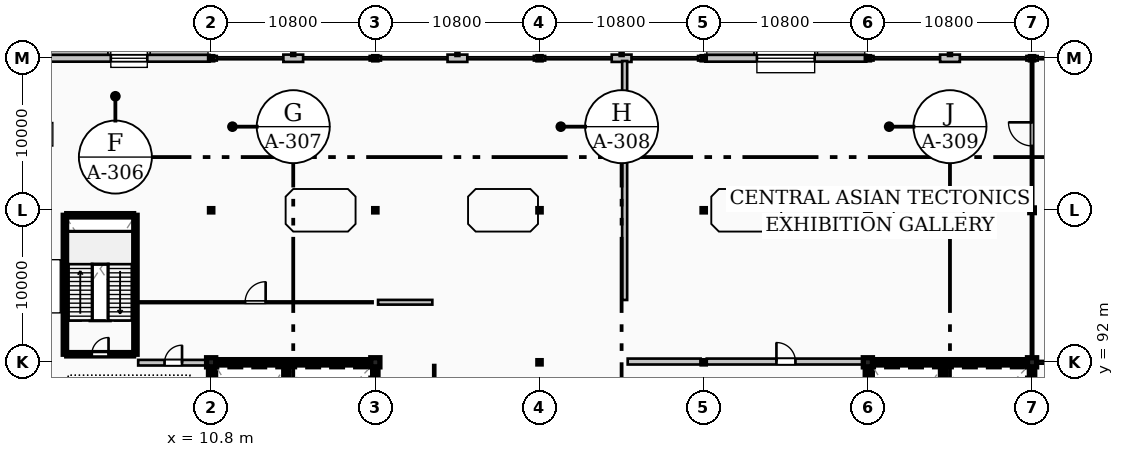
"""IFC4 building model, lengths in metres.
Left out: names, types, materials, properties, quantities, classifications, styles, units other than length and angle.
Written with IfcOpenShell. Run it as: python <this file> out.ifc"""

import sys

from ifc_helpers import new_model, si_unit, direction, frame, frame_2d, origin, origin_2d, place, context, subcontext, project, spatial, rectangle, hollow_rectangle, i_section, extrude, element, fill, save


model = new_model("IFC4")
c1 = context("Model", 3, precision=1e-05, world=origin(), true_north=direction((0.0, 1.0)))
c2 = subcontext(c1, "Body", "Model", "MODEL_VIEW")
j1 = project(units=[si_unit("LENGTHUNIT", "METRE"), si_unit("PLANEANGLEUNIT", "RADIAN")], contexts=[c1])
p1 = place(None, origin())
s1 = spatial("IfcSite", under=j1, at=p1, CompositionType="ELEMENT")
p2 = place(p1, origin())
s2 = spatial("IfcBuilding", under=s1, at=p2, CompositionType="ELEMENT")
p3 = place(p2, frame((0.0, 0.0, 24.0)))
s3 = spatial("IfcBuildingStorey", under=s2, at=p3, CompositionType="ELEMENT", Elevation=24.0)
p4 = place(p3, frame((10.8, 92.0, 0.0), z_axis=(0.0, 0.0, 1.0), x_axis=(1.0, 0.0, 0.0)))
e1 = element("IfcColumn", 1, at=p4, inside=s3, PredefinedType="COLUMN", context=c2, shape_type="SweptSolid", body=[
    extrude(rectangle(XDim=0.6, YDim=0.6, at=origin_2d()), origin(), (0.0, 0.0, 1.0), 4.8),
])
for number, where, z_axis, x_axis in (
    (2, (10.8, 102.0, 0.0), (0.0, 0.0, 1.0), (1.0, 0.0, 0.0)),
    (3, (10.8, 112.0, 0.0), (0.0, 0.0, 1.0), (1.0, 0.0, 0.0)),
):
    element("IfcColumn", number, at=place(p3, frame(where, z_axis=z_axis, x_axis=x_axis)), inside=s3, PredefinedType="COLUMN", context=c2, shape_type="SweptSolid", body=[
        extrude(hollow_rectangle(XDim=0.22, YDim=0.22, WallThickness=0.012, InnerFilletRadius=0.012, OuterFilletRadius=0.025, at=origin_2d()), origin(), (0.0, 0.0, 1.0), 4.8),
    ])
p5 = place(p3, frame((21.6, 92.0, 0.0), z_axis=(0.0, 0.0, 1.0), x_axis=(1.0, 0.0, 0.0)))
e4 = element("IfcColumn", 4, at=p5, inside=s3, PredefinedType="COLUMN", context=c2, shape_type="SweptSolid", body=[
    extrude(rectangle(XDim=0.6, YDim=0.6, at=origin_2d()), origin(), (0.0, 0.0, 1.0), 4.8),
])
for number, where, z_axis, x_axis in (
    (5, (21.6, 102.0, 0.0), (0.0, 0.0, 1.0), (1.0, 0.0, 0.0)),
    (6, (21.6, 112.0, 0.0), (0.0, 0.0, 1.0), (1.0, 0.0, 0.0)),
    (7, (32.4, 92.0, 0.0), (0.0, 0.0, 1.0), (1.0, 0.0, 0.0)),
    (8, (32.4, 102.0, 0.0), (0.0, 0.0, 1.0), (1.0, 0.0, 0.0)),
    (9, (32.4, 112.0, 0.0), (0.0, 0.0, 1.0), (1.0, 0.0, 0.0)),
    (10, (43.2, 92.0, 0.0), (0.0, 0.0, 1.0), (1.0, 0.0, 0.0)),
    (11, (43.2, 102.0, 0.0), (0.0, 0.0, 1.0), (1.0, 0.0, 0.0)),
    (12, (43.2, 112.0, 0.0), (0.0, 0.0, 1.0), (1.0, 0.0, 0.0)),
):
    element("IfcColumn", number, at=place(p3, frame(where, z_axis=z_axis, x_axis=x_axis)), inside=s3, PredefinedType="COLUMN", context=c2, shape_type="SweptSolid", body=[
        extrude(hollow_rectangle(XDim=0.22, YDim=0.22, WallThickness=0.012, InnerFilletRadius=0.012, OuterFilletRadius=0.025, at=origin_2d()), origin(), (0.0, 0.0, 1.0), 4.8),
    ])
p6 = place(p3, frame((54.0, 92.0, 0.0), z_axis=(0.0, 0.0, 1.0), x_axis=(1.0, 0.0, 0.0)))
e13 = element("IfcColumn", 13, at=p6, inside=s3, PredefinedType="COLUMN", context=c2, shape_type="SweptSolid", body=[
    extrude(rectangle(XDim=0.6, YDim=0.6, at=origin_2d()), origin(), (0.0, 0.0, 1.0), 4.8),
])
p7 = place(p3, frame((54.0, 102.0, 0.0), z_axis=(0.0, 0.0, 1.0), x_axis=(1.0, 0.0, 0.0)))
e14 = element("IfcColumn", 14, at=p7, inside=s3, PredefinedType="COLUMN", context=c2, shape_type="SweptSolid", body=[
    extrude(i_section(OverallWidth=0.3, OverallDepth=0.31, WebThickness=0.009, FlangeThickness=0.015, FilletRadius=0.027, at=origin_2d()), origin(), (0.0, 0.0, 1.0), 4.8),
])
p8 = place(p3, frame((54.0, 112.0, 0.0), z_axis=(0.0, 0.0, 1.0), x_axis=(1.0, 0.0, 0.0)))
e15 = element("IfcColumn", 15, at=p8, inside=s3, PredefinedType="COLUMN", context=c2, shape_type="SweptSolid", body=[
    extrude(hollow_rectangle(XDim=0.22, YDim=0.22, WallThickness=0.012, InnerFilletRadius=0.012, OuterFilletRadius=0.025, at=origin_2d()), origin(), (0.0, 0.0, 1.0), 4.8),
])
p9 = place(p3, frame((64.8, 92.0, 0.0), z_axis=(0.0, 0.0, 1.0), x_axis=(1.0, 0.0, 0.0)))
e16 = element("IfcColumn", 16, at=p9, inside=s3, PredefinedType="COLUMN", context=c2, shape_type="SweptSolid", body=[
    extrude(rectangle(XDim=0.6, YDim=0.6, at=origin_2d()), origin(), (0.0, 0.0, 1.0), 4.8),
])
p10 = place(p3, frame((64.8, 102.0, 0.0), z_axis=(0.0, 0.0, 1.0), x_axis=(1.0, 0.0, 0.0)))
e17 = element("IfcColumn", 17, at=p10, inside=s3, PredefinedType="COLUMN", context=c2, shape_type="SweptSolid", body=[
    extrude(i_section(OverallWidth=0.3, OverallDepth=0.31, WebThickness=0.009, FlangeThickness=0.015, FilletRadius=0.027, at=origin_2d()), origin(), (0.0, 0.0, 1.0), 4.8),
])
p11 = place(p3, frame((64.8, 112.0, 0.0), z_axis=(0.0, 0.0, 1.0), x_axis=(1.0, 0.0, 0.0)))
e18 = element("IfcColumn", 18, at=p11, inside=s3, PredefinedType="COLUMN", context=c2, shape_type="SweptSolid", body=[
    extrude(hollow_rectangle(XDim=0.22, YDim=0.22, WallThickness=0.012, InnerFilletRadius=0.012, OuterFilletRadius=0.025, at=origin_2d()), origin(), (0.0, 0.0, 1.0), 4.8),
])
p12 = place(p3, frame((65.17, 112.0, 0.0), z_axis=(0.0, 0.0, 1.0), x_axis=(-1.0, 0.0, 0.0)))
e19 = element("IfcWall", 19, at=p12, inside=s3, PredefinedType="STANDARD", context=c2, shape_type="SweptSolid", body=[
    extrude(rectangle(XDim=0.264, YDim=0.3, at=frame_2d((0.132, 0.0))), origin(), (0.0, 0.0, 1.0), 4.56),
])
p13 = place(p3, frame((60.05, 112.0, 0.0), z_axis=(0.0, 0.0, 1.0), x_axis=(-1.0, 0.0, 0.0)))
e20 = element("IfcWall", 20, at=p13, inside=s3, PredefinedType="STANDARD", context=c2, shape_type="SweptSolid", body=[
    extrude(rectangle(XDim=1.3, YDim=0.48, at=frame_2d((0.65, 0.0))), origin(), (0.0, 0.0, 1.0), 4.219),
])
for number, where, z_axis, x_axis in (
    (21, (64.694, 112.0, 0.0), (0.0, 0.0, 1.0), (-1.0, 0.0, 0.0)),
    (22, (54.37, 112.0, 0.0), (0.0, 0.0, 1.0), (-1.0, 0.0, 0.0)),
):
    element("IfcWall", number, at=place(p3, frame(where, z_axis=z_axis, x_axis=x_axis)), inside=s3, PredefinedType="STANDARD", context=c2, shape_type="SweptSolid", body=[
        extrude(rectangle(XDim=0.264, YDim=0.3, at=frame_2d((0.132, 0.0))), origin(), (0.0, 0.0, 1.0), 4.56),
    ])
p14 = place(p3, frame((53.894, 112.0, 0.0), z_axis=(0.0, 0.0, 1.0), x_axis=(-1.0, 0.0, 0.0)))
e23 = element("IfcWall", 23, at=p14, inside=s3, PredefinedType="STANDARD", context=c2, shape_type="SweptSolid", body=[
    extrude(rectangle(XDim=10.588, YDim=0.45, at=frame_2d((5.294, 0.0))), origin(), (0.0, 0.0, 1.0), 4.219),
])
p15 = place(p14, frame((3.394, 0.0, 1.0)))
e24 = element("IfcOpeningElement", 24, at=p15, cuts=e23, PredefinedType="OPENING", context=c2, shape_type="SweptSolid", body=[
    extrude(rectangle(XDim=3.8, YDim=2.1, at=frame_2d((1.9, 1.05))), frame((0.0, 0.235, 0.0), z_axis=(0.0, -1.0, 0.0), x_axis=(1.0, 0.0, 0.0)), (0.0, 0.0, 1.0), 0.47),
])
p16 = place(p3, frame((38.45, 112.0, 0.0), z_axis=(0.0, 0.0, 1.0), x_axis=(-1.0, 0.0, 0.0)))
e25 = element("IfcWall", 25, at=p16, inside=s3, PredefinedType="STANDARD", context=c2, shape_type="SweptSolid", body=[
    extrude(rectangle(XDim=1.3, YDim=0.48, at=frame_2d((0.65, 0.0))), origin(), (0.0, 0.0, 1.0), 4.219),
])
for number, where, z_axis, x_axis in (
    (26, (43.094, 112.0, 0.0), (0.0, 0.0, 1.0), (-1.0, 0.0, 0.0)),
    (27, (32.77, 112.0, 0.0), (0.0, 0.0, 1.0), (-1.0, 0.0, 0.0)),
):
    element("IfcWall", number, at=place(p3, frame(where, z_axis=z_axis, x_axis=x_axis)), inside=s3, PredefinedType="STANDARD", context=c2, shape_type="SweptSolid", body=[
        extrude(rectangle(XDim=0.264, YDim=0.3, at=frame_2d((0.132, 0.0))), origin(), (0.0, 0.0, 1.0), 4.56),
    ])
p17 = place(p3, frame((27.65, 112.0, 0.0), z_axis=(0.0, 0.0, 1.0), x_axis=(-1.0, 0.0, 0.0)))
e28 = element("IfcWall", 28, at=p17, inside=s3, PredefinedType="STANDARD", context=c2, shape_type="SweptSolid", body=[
    extrude(rectangle(XDim=1.3, YDim=0.48, at=frame_2d((0.65, 0.0))), origin(), (0.0, 0.0, 1.0), 4.219),
])
for number, where, z_axis, x_axis in (
    (29, (32.294, 112.0, 0.0), (0.0, 0.0, 1.0), (-1.0, 0.0, 0.0)),
    (30, (21.97, 112.0, 0.0), (0.0, 0.0, 1.0), (-1.0, 0.0, 0.0)),
):
    element("IfcWall", number, at=place(p3, frame(where, z_axis=z_axis, x_axis=x_axis)), inside=s3, PredefinedType="STANDARD", context=c2, shape_type="SweptSolid", body=[
        extrude(rectangle(XDim=0.264, YDim=0.3, at=frame_2d((0.132, 0.0))), origin(), (0.0, 0.0, 1.0), 4.56),
    ])
p18 = place(p3, frame((16.85, 112.0, 0.0), z_axis=(0.0, 0.0, 1.0), x_axis=(-1.0, 0.0, 0.0)))
e31 = element("IfcWall", 31, at=p18, inside=s3, PredefinedType="STANDARD", context=c2, shape_type="SweptSolid", body=[
    extrude(rectangle(XDim=1.3, YDim=0.48, at=frame_2d((0.65, 0.0))), origin(), (0.0, 0.0, 1.0), 4.219),
])
for number, where, z_axis, x_axis in (
    (32, (21.494, 112.0, 0.0), (0.0, 0.0, 1.0), (-1.0, 0.0, 0.0)),
    (33, (11.17, 112.0, 0.0), (0.0, 0.0, 1.0), (-1.0, 0.0, 0.0)),
):
    element("IfcWall", number, at=place(p3, frame(where, z_axis=z_axis, x_axis=x_axis)), inside=s3, PredefinedType="STANDARD", context=c2, shape_type="SweptSolid", body=[
        extrude(rectangle(XDim=0.264, YDim=0.3, at=frame_2d((0.132, 0.0))), origin(), (0.0, 0.0, 1.0), 4.56),
    ])
p19 = place(p3, frame((10.694, 112.0, 0.0), z_axis=(0.0, 0.0, 1.0), x_axis=(-1.0, 0.0, 0.0)))
e34 = element("IfcWall", 34, at=p19, inside=s3, PredefinedType="STANDARD", context=c2, shape_type="SweptSolid", body=[
    extrude(rectangle(XDim=10.588, YDim=0.45, at=frame_2d((5.294, 0.0))), origin(), (0.0, 0.0, 1.0), 4.219),
])
p20 = place(p19, frame((4.094, 0.0, 1.0)))
e35 = element("IfcOpeningElement", 35, at=p20, cuts=e34, PredefinedType="OPENING", context=c2, shape_type="SweptSolid", body=[
    extrude(rectangle(XDim=2.4, YDim=2.4, at=frame_2d((1.2, 1.2))), frame((0.0, 0.235, 0.0), z_axis=(0.0, -1.0, 0.0), x_axis=(1.0, 0.0, 0.0)), (0.0, 0.0, 1.0), 0.47),
])
p21 = place(p3, frame((11.1, 92.0, 0.0), z_axis=(0.0, 0.0, 1.0), x_axis=(1.0, 0.0, 0.0)))
e36 = element("IfcWall", 36, at=p21, inside=s3, PredefinedType="SHEAR", context=c2, shape_type="SweptSolid", body=[
    extrude(rectangle(XDim=10.2, YDim=0.35, at=frame_2d((5.1, 0.0))), origin(), (0.0, 0.0, 1.0), 4.56),
])
p22 = place(p3, frame((10.8, 82.3, 0.0), z_axis=(0.0, 0.0, 1.0), x_axis=(0.0, 1.0, 0.0)))
e37 = element("IfcWall", 37, at=p22, inside=s3, PredefinedType="SHEAR", context=c2, shape_type="SweptSolid", body=[
    extrude(rectangle(XDim=9.4, YDim=0.35, at=frame_2d((4.7, 0.0))), origin(), (0.0, 0.0, 1.0), 4.56),
])
p23 = place(p3, frame((21.6, 82.3, 0.0), z_axis=(0.0, 0.0, 1.0), x_axis=(0.0, 1.0, 0.0)))
e38 = element("IfcWall", 38, at=p23, inside=s3, PredefinedType="SHEAR", context=c2, shape_type="SweptSolid", body=[
    extrude(rectangle(XDim=9.4, YDim=0.35, at=frame_2d((4.7, 0.0))), origin(), (0.0, 0.0, 1.0), 4.56),
])
p24 = place(p23, frame((0.88, 0.0, 0.0)))
e39 = element("IfcOpeningElement", 39, at=p24, cuts=e38, PredefinedType="OPENING", context=c2, shape_type="SweptSolid", body=[
    extrude(rectangle(XDim=1.8, YDim=2.25, at=frame_2d((0.9, 1.125))), frame((0.0, 0.185, 0.0), z_axis=(0.0, -1.0, 0.0), x_axis=(1.0, 0.0, 0.0)), (0.0, 0.0, 1.0), 0.37),
])
p25 = place(p3, frame((15.75, 82.22, 0.0), z_axis=(0.0, 0.0, 1.0), x_axis=(0.0, 1.0, 0.0)))
e40 = element("IfcWall", 40, at=p25, inside=s3, PredefinedType="SHEAR", context=c2, shape_type="SweptSolid", body=[
    extrude(rectangle(XDim=9.605, YDim=0.35, at=frame_2d((4.802, 0.0))), origin(), (0.0, 0.0, 1.0), 4.56),
])
p26 = place(p25, frame((0.9, 0.0, 0.0)))
e41 = element("IfcOpeningElement", 41, at=p26, cuts=e40, PredefinedType="OPENING", context=c2, shape_type="SweptSolid", body=[
    extrude(rectangle(XDim=1.1, YDim=2.2, at=frame_2d((0.55, 1.1))), frame((0.0, 0.185, 0.0), z_axis=(0.0, -1.0, 0.0), x_axis=(1.0, 0.0, 0.0)), (0.0, 0.0, 1.0), 0.37),
])
p27 = place(p3, frame((54.3, 92.0, 0.0), z_axis=(0.0, 0.0, 1.0), x_axis=(1.0, 0.0, 0.0)))
e42 = element("IfcWall", 42, at=p27, inside=s3, PredefinedType="SHEAR", context=c2, shape_type="SweptSolid", body=[
    extrude(rectangle(XDim=10.2, YDim=0.35, at=frame_2d((5.1, 0.0))), origin(), (0.0, 0.0, 1.0), 4.56),
])
p28 = place(p3, frame((54.0, 82.3, 0.0), z_axis=(0.0, 0.0, 1.0), x_axis=(0.0, 1.0, 0.0)))
e43 = element("IfcWall", 43, at=p28, inside=s3, PredefinedType="SHEAR", context=c2, shape_type="SweptSolid", body=[
    extrude(rectangle(XDim=9.4, YDim=0.35, at=frame_2d((4.7, 0.0))), origin(), (0.0, 0.0, 1.0), 4.56),
])
p29 = place(p3, frame((64.8, 82.3, 0.0), z_axis=(0.0, 0.0, 1.0), x_axis=(0.0, 1.0, 0.0)))
e44 = element("IfcWall", 44, at=p29, inside=s3, PredefinedType="SHEAR", context=c2, shape_type="SweptSolid", body=[
    extrude(rectangle(XDim=9.4, YDim=0.35, at=frame_2d((4.7, 0.0))), origin(), (0.0, 0.0, 1.0), 4.56),
])
p30 = place(p29, frame((0.88, 0.0, 0.0)))
e45 = element("IfcOpeningElement", 45, at=p30, cuts=e44, PredefinedType="OPENING", context=c2, shape_type="SweptSolid", body=[
    extrude(rectangle(XDim=1.8, YDim=2.25, at=frame_2d((0.9, 1.125))), frame((0.0, 0.185, 0.0), z_axis=(0.0, -1.0, 0.0), x_axis=(1.0, 0.0, 0.0)), (0.0, 0.0, 1.0), 0.37),
])
p31 = place(p3, frame((58.95, 82.175, 0.0), z_axis=(0.0, 0.0, 1.0), x_axis=(0.0, 1.0, 0.0)))
e46 = element("IfcWall", 46, at=p31, inside=s3, PredefinedType="SHEAR", context=c2, shape_type="SweptSolid", body=[
    extrude(rectangle(XDim=9.65, YDim=0.35, at=frame_2d((4.825, 0.0))), origin(), (0.0, 0.0, 1.0), 4.56),
])
p32 = place(p31, frame((0.9, 0.0, 0.0)))
e47 = element("IfcOpeningElement", 47, at=p32, cuts=e46, PredefinedType="OPENING", context=c2, shape_type="SweptSolid", body=[
    extrude(rectangle(XDim=1.1, YDim=2.2, at=frame_2d((0.55, 1.1))), frame((0.0, 0.185, 0.0), z_axis=(0.0, -1.0, 0.0), x_axis=(1.0, 0.0, 0.0)), (0.0, 0.0, 1.0), 0.37),
])
for number, where, z_axis, x_axis in (
    (48, (1.18, 92.53, 0.0), (0.0, 0.0, 1.0), (0.0, 1.0, 0.0)),
    (49, (5.82, 92.53, 0.0), (0.0, 0.0, 1.0), (0.0, 1.0, 0.0)),
):
    element("IfcWall", number, at=place(p3, frame(where, z_axis=z_axis, x_axis=x_axis)), inside=s3, PredefinedType="SHEAR", context=c2, shape_type="SweptSolid", body=[
        extrude(rectangle(XDim=9.14, YDim=0.22, at=frame_2d((4.57, 0.0))), origin(), (0.0, 0.0, 1.0), 4.56),
    ])
p33 = place(p3, frame((1.3, 101.67, 0.0), z_axis=(0.0, 0.0, 1.0), x_axis=(1.0, 0.0, 0.0)))
e50 = element("IfcWall", 50, at=p33, inside=s3, PredefinedType="SHEAR", context=c2, shape_type="SweptSolid", body=[
    extrude(rectangle(XDim=4.4, YDim=0.22, at=frame_2d((2.2, 0.0))), origin(), (0.0, 0.0, 1.0), 4.56),
])
p34 = place(p3, frame((1.3, 92.53, 0.0), z_axis=(0.0, 0.0, 1.0), x_axis=(1.0, 0.0, 0.0)))
e51 = element("IfcWall", 51, at=p34, inside=s3, PredefinedType="SHEAR", context=c2, shape_type="SweptSolid", body=[
    extrude(rectangle(XDim=4.4, YDim=0.22, at=frame_2d((2.2, 0.0))), origin(), (0.0, 0.0, 1.0), 4.56),
])
p35 = place(p34, frame((1.65, 0.0, 0.0)))
e52 = element("IfcOpeningElement", 52, at=p35, cuts=e51, PredefinedType="OPENING", context=c2, shape_type="SweptSolid", body=[
    extrude(rectangle(XDim=1.1, YDim=2.2, at=frame_2d((0.55, 1.1))), frame((0.0, 0.12, 0.0), z_axis=(0.0, -1.0, 0.0), x_axis=(1.0, 0.0, 0.0)), (0.0, 0.0, 1.0), 0.24),
])
p36 = place(p3, frame((6.0, 91.975, 0.0), z_axis=(0.0, 0.0, 1.0), x_axis=(1.0, 0.0, 0.0)))
e53 = element("IfcWall", 53, at=p36, inside=s3, PredefinedType="PARTITIONING", context=c2, shape_type="SweptSolid", body=[
    extrude(rectangle(XDim=4.62, YDim=0.37, at=frame_2d((2.31, 0.0))), origin(), (0.0, 0.0, 1.0), 4.17),
])
p37 = place(p36, frame((1.735, 0.0, 0.0)))
e54 = element("IfcOpeningElement", 54, at=p37, cuts=e53, PredefinedType="OPENING", context=c2, shape_type="SweptSolid", body=[
    extrude(rectangle(XDim=1.15, YDim=2.25, at=frame_2d((0.575, 1.125))), frame((0.0, 0.195, 0.0), z_axis=(0.0, -1.0, 0.0), x_axis=(1.0, 0.0, 0.0)), (0.0, 0.0, 1.0), 0.39),
])
p38 = place(p3, frame((38.2, 92.05, 0.0), z_axis=(0.0, 0.0, 1.0), x_axis=(1.0, 0.0, 0.0)))
e55 = element("IfcWall", 55, at=p38, inside=s3, PredefinedType="PARTITIONING", context=c2, shape_type="SweptSolid", body=[
    extrude(rectangle(XDim=4.8, YDim=0.39, at=frame_2d((2.4, 0.0))), origin(), (0.0, 0.0, 1.0), 4.17),
])
p39 = place(p3, frame((43.4, 92.05, 0.0), z_axis=(0.0, 0.0, 1.0), x_axis=(1.0, 0.0, 0.0)))
e56 = element("IfcWall", 56, at=p39, inside=s3, PredefinedType="PARTITIONING", context=c2, shape_type="SweptSolid", body=[
    extrude(rectangle(XDim=10.42, YDim=0.39, at=frame_2d((5.21, 0.0))), origin(), (0.0, 0.0, 1.0), 4.17),
])
p40 = place(p39, frame((4.585, 0.0, 0.0)))
e57 = element("IfcOpeningElement", 57, at=p40, cuts=e56, PredefinedType="OPENING", context=c2, shape_type="SweptSolid", body=[
    extrude(rectangle(XDim=1.25, YDim=2.3, at=frame_2d((0.625, 1.15))), frame((0.0, 0.205, 0.0), z_axis=(0.0, -1.0, 0.0), x_axis=(1.0, 0.0, 0.0)), (0.0, 0.0, 1.0), 0.41),
])
p41 = place(p3, frame((6.0, 95.95, 0.0), z_axis=(0.0, 0.0, 1.0), x_axis=(1.0, 0.0, 0.0)))
e58 = element("IfcWall", 58, at=p41, inside=s3, PredefinedType="PARTITIONING", context=c2, shape_type="SweptSolid", body=[
    extrude(rectangle(XDim=15.42, YDim=0.11, at=frame_2d((7.71, 0.0))), origin(), (0.0, 0.0, 1.0), 4.52),
])
p42 = place(p41, frame((7.035, 0.0, 0.0)))
e59 = element("IfcOpeningElement", 59, at=p42, cuts=e58, PredefinedType="OPENING", context=c2, shape_type="SweptSolid", body=[
    extrude(rectangle(XDim=1.35, YDim=2.35, at=frame_2d((0.675, 1.175))), frame((0.0, 0.065, 0.0), z_axis=(0.0, -1.0, 0.0), x_axis=(1.0, 0.0, 0.0)), (0.0, 0.0, 1.0), 0.13),
])
p43 = place(p3, frame((25.475, 86.3, 0.0), z_axis=(0.0, 0.0, 1.0), x_axis=(0.0, 1.0, 0.0)))
e60 = element("IfcWall", 60, at=p43, inside=s3, PredefinedType="PARTITIONING", context=c2, shape_type="SweptSolid", body=[
    extrude(rectangle(XDim=5.52, YDim=0.13, at=frame_2d((2.76, 0.0))), origin(), (0.0, 0.0, 1.0), 4.52),
])
p44 = place(p43, frame((2.035, 0.0, 0.0)))
e61 = element("IfcOpeningElement", 61, at=p44, cuts=e60, PredefinedType="OPENING", context=c2, shape_type="SweptSolid", body=[
    extrude(rectangle(XDim=1.45, YDim=2.35, at=frame_2d((0.725, 1.175))), frame((0.0, 0.075, 0.0), z_axis=(0.0, -1.0, 0.0), x_axis=(1.0, 0.0, 0.0)), (0.0, 0.0, 1.0), 0.15),
])
p45 = place(p3, frame((64.8, 92.18, 0.0), z_axis=(0.0, 0.0, 1.0), x_axis=(0.0, 1.0, 0.0)))
e62 = element("IfcWall", 62, at=p45, inside=s3, PredefinedType="PARTITIONING", context=c2, shape_type="SweptSolid", body=[
    extrude(rectangle(XDim=9.62, YDim=0.15, at=frame_2d((4.81, 0.0))), origin(), (0.0, 0.0, 1.0), 4.06),
])
p46 = place(p3, frame((64.8, 102.2, 0.0), z_axis=(0.0, 0.0, 1.0), x_axis=(0.0, 1.0, 0.0)))
e63 = element("IfcWall", 63, at=p46, inside=s3, PredefinedType="PARTITIONING", context=c2, shape_type="SweptSolid", body=[
    extrude(rectangle(XDim=9.62, YDim=0.15, at=frame_2d((4.81, 0.0))), origin(), (0.0, 0.0, 1.0), 4.06),
])
p47 = place(p46, frame((4.035, 0.0, 0.0)))
e64 = element("IfcOpeningElement", 64, at=p47, cuts=e63, PredefinedType="OPENING", context=c2, shape_type="SweptSolid", body=[
    extrude(rectangle(XDim=1.55, YDim=2.4, at=frame_2d((0.775, 1.2))), frame((0.0, 0.085, 0.0), z_axis=(0.0, -1.0, 0.0), x_axis=(1.0, 0.0, 0.0)), (0.0, 0.0, 1.0), 0.17),
])
p48 = place(p3, frame((64.98, 92.0, 0.0), z_axis=(0.0, 0.0, 1.0), x_axis=(1.0, 0.0, 0.0)))
e65 = element("IfcWall", 65, at=p48, inside=s3, PredefinedType="PLUMBINGWALL", context=c2, shape_type="SweptSolid", body=[
    extrude(rectangle(XDim=4.62, YDim=0.18, at=frame_2d((2.31, 0.0))), origin(), (0.0, 0.0, 1.0), 4.17),
])
p49 = place(p3, frame((21.78, 95.95, 0.0), z_axis=(0.0, 0.0, 1.0), x_axis=(1.0, 0.0, 0.0)))
e66 = element("IfcWall", 66, at=p49, inside=s3, PredefinedType="PARTITIONING", context=c2, shape_type="SweptSolid", body=[
    extrude(rectangle(XDim=3.57, YDim=0.31, at=frame_2d((1.785, 0.0))), origin(), (0.0, 0.0, 1.0), 4.52),
])
p50 = place(p3, frame((38.0, 96.1, 0.0), z_axis=(0.0, 0.0, 1.0), x_axis=(0.0, 1.0, 0.0)))
e67 = element("IfcWall", 67, at=p50, inside=s3, PredefinedType="PARTITIONING", context=c2, shape_type="SweptSolid", body=[
    extrude(rectangle(XDim=15.72, YDim=0.33, at=frame_2d((7.86, 0.0))), origin(), (0.0, 0.0, 1.0), 4.52),
])
p51 = place(p15, origin())
e68 = element("IfcWindow", 68, at=p51, inside=s3, PartitioningType="SINGLE_PANEL", PredefinedType="WINDOW", context=c2, shape_type="SweptSolid", body=[
    extrude(rectangle(XDim=3.8, YDim=2.1, at=frame_2d((1.9, 1.05))), frame((0.0, 0.03, 0.0), z_axis=(0.0, -1.0, 0.0), x_axis=(1.0, 0.0, 0.0)), (0.0, 0.0, 1.0), 0.06),
])
fill(e24, e68)
p52 = place(p20, origin())
e69 = element("IfcWindow", 69, at=p52, inside=s3, PartitioningType="SINGLE_PANEL", PredefinedType="WINDOW", context=c2, shape_type="SweptSolid", body=[
    extrude(rectangle(XDim=2.4, YDim=2.4, at=frame_2d((1.2, 1.2))), frame((0.0, 0.03, 0.0), z_axis=(0.0, -1.0, 0.0), x_axis=(1.0, 0.0, 0.0)), (0.0, 0.0, 1.0), 0.06),
])
fill(e35, e69)
p53 = place(p35, origin())
e70 = element("IfcDoor", 70, at=p53, inside=s3, OperationType="SINGLE_SWING_RIGHT", PredefinedType="DOOR", context=c2, shape_type="SweptSolid", body=[
    extrude(rectangle(XDim=1.1, YDim=2.2, at=frame_2d((0.55, 1.1))), frame((0.0, 0.025, 0.0), z_axis=(0.0, -1.0, 0.0), x_axis=(1.0, 0.0, 0.0)), (0.0, 0.0, 1.0), 0.05),
])
fill(e52, e70)
p54 = place(p37, origin())
e71 = element("IfcDoor", 71, at=p54, inside=s3, OperationType="SINGLE_SWING_RIGHT", PredefinedType="DOOR", context=c2, shape_type="SweptSolid", body=[
    extrude(rectangle(XDim=1.15, YDim=2.25, at=frame_2d((0.575, 1.125))), frame((0.0, 0.025, 0.0), z_axis=(0.0, -1.0, 0.0), x_axis=(1.0, 0.0, 0.0)), (0.0, 0.0, 1.0), 0.05),
])
fill(e54, e71)
p55 = place(p40, origin())
e72 = element("IfcDoor", 72, at=p55, inside=s3, OperationType="SINGLE_SWING_LEFT", PredefinedType="DOOR", context=c2, shape_type="SweptSolid", body=[
    extrude(rectangle(XDim=1.25, YDim=2.3, at=frame_2d((0.625, 1.15))), frame((0.0, 0.025, 0.0), z_axis=(0.0, -1.0, 0.0), x_axis=(1.0, 0.0, 0.0)), (0.0, 0.0, 1.0), 0.05),
])
fill(e57, e72)
p56 = place(p42, origin())
e73 = element("IfcDoor", 73, at=p56, inside=s3, OperationType="SINGLE_SWING_RIGHT", PredefinedType="DOOR", context=c2, shape_type="SweptSolid", body=[
    extrude(rectangle(XDim=1.35, YDim=2.35, at=frame_2d((0.675, 1.175))), frame((0.0, 0.025, 0.0), z_axis=(0.0, -1.0, 0.0), x_axis=(1.0, 0.0, 0.0)), (0.0, 0.0, 1.0), 0.05),
])
fill(e59, e73)
p57 = place(p47, origin())
e74 = element("IfcDoor", 74, at=p57, inside=s3, OperationType="SINGLE_SWING_RIGHT", PredefinedType="DOOR", context=c2, shape_type="SweptSolid", body=[
    extrude(rectangle(XDim=1.55, YDim=2.4, at=frame_2d((0.775, 1.2))), frame((0.0, 0.025, 0.0), z_axis=(0.0, -1.0, 0.0), x_axis=(1.0, 0.0, 0.0)), (0.0, 0.0, 1.0), 0.05),
])
fill(e64, e74)
save(model, sys.argv[1])
